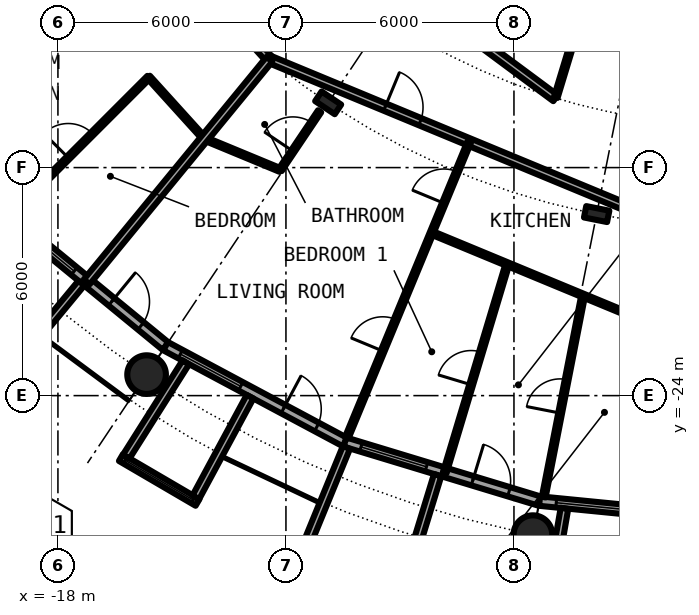
"""IFC4 building model, lengths in metres.
Left out: names, types, materials, properties, quantities, classifications, styles, units other than length and angle.
Written with IfcOpenShell. Run it as: python <this file> out.ifc"""

import sys

from ifc_helpers import new_model, si_unit, direction, frame, frame_2d, origin, origin_2d, place, context, subcontext, project, spatial, rectangle, circle, hollow_circle, i_section, extrude, element, fill, save


model = new_model("IFC4")
c1 = context("Model", 3, precision=1e-05, world=origin(), true_north=direction((0.0, 1.0)))
c2 = subcontext(c1, "Body", "Model", "MODEL_VIEW")
j1 = project(units=[si_unit("LENGTHUNIT", "METRE"), si_unit("PLANEANGLEUNIT", "RADIAN")], contexts=[c1])
p1 = place(None, origin())
s1 = spatial("IfcSite", under=j1, at=p1, CompositionType="ELEMENT")
p2 = place(p1, origin())
s2 = spatial("IfcBuilding", under=s1, at=p2, CompositionType="ELEMENT")
p3 = place(p2, frame((0.0, 0.0, 47.2)))
s3 = spatial("IfcBuildingStorey", under=s2, at=p3, CompositionType="ELEMENT", Elevation=47.2)
for number, where, z_axis, x_axis in (
    (1, (-15.667, -23.448, 0.0), (0.0, 0.0, 1.0), (1.0, 0.0, 0.0)),
    (2, (-5.501, -27.658, 0.0), (0.0, 0.0, 1.0), (1.0, 0.0, 0.0)),
):
    element("IfcColumn", number, at=place(p3, frame(where, z_axis=z_axis, x_axis=x_axis)), inside=s3, PredefinedType="COLUMN", context=c2, shape_type="SweptSolid", body=[
        extrude(hollow_circle(Radius=0.508, WallThickness=0.05, at=origin_2d()), origin(), (0.0, 0.0, 1.0), 3.05),
    ])
for number, where, z_axis, x_axis in (
    (3, (-10.889, -16.297, 0.0), (0.0, 0.0, 1.0), (-0.556, -0.831, 0.0)),
    (4, (-3.824, -19.223, 0.0), (0.0, 0.0, 1.0), (-0.195, -0.981, 0.0)),
):
    element("IfcColumn", number, at=place(p3, frame(where, z_axis=z_axis, x_axis=x_axis)), inside=s3, PredefinedType="COLUMN", context=c2, shape_type="SweptSolid", body=[
        extrude(i_section(OverallWidth=0.305, OverallDepth=0.62, WebThickness=0.021, FlangeThickness=0.04, FilletRadius=0.027, at=origin_2d()), origin(), (0.0, 0.0, 1.0), 3.05),
    ])
p4 = place(p3, frame((-19.304, -19.304, 0.0), z_axis=(0.0, 0.0, 1.0), x_axis=(0.773019449054, -0.634382322723, 0.0)))
e5 = element("IfcWall", 5, at=p4, inside=s3, PredefinedType="SOLIDWALL", context=c2, shape_type="SweptSolid", body=[
    extrude(rectangle(XDim=5.352, YDim=0.25, at=frame_2d((2.676, 0.0))), origin(), (0.0, 0.0, 1.0), 2.7),
])
p5 = place(p4, frame((0.441, 0.0, 0.3)))
e6 = element("IfcOpeningElement", 6, at=p5, cuts=e5, PredefinedType="OPENING", context=c2, shape_type="SweptSolid", body=[
    extrude(rectangle(XDim=1.8, YDim=2.1, at=frame_2d((0.9, 1.05))), frame((0.0, 0.135, 0.0), z_axis=(0.0, -1.0, 0.0), x_axis=(1.0, 0.0, 0.0)), (0.0, 0.0, 1.0), 0.27),
])
p6 = place(p4, frame((3.51, 0.0, 0.0)))
e7 = element("IfcOpeningElement", 7, at=p6, cuts=e5, PredefinedType="OPENING", context=c2, shape_type="SweptSolid", body=[
    extrude(rectangle(XDim=1.0, YDim=2.2, at=frame_2d((0.5, 1.1))), frame((0.0, 0.135, 0.0), z_axis=(0.0, -1.0, 0.0), x_axis=(1.0, 0.0, 0.0)), (0.0, 0.0, 1.0), 0.27),
])
p7 = place(p3, frame((-17.384, -21.041, -0.03), z_axis=(0.0, 0.0, 1.0), x_axis=(-0.63709551667, -0.770784861449, 0.0)))
e8 = element("IfcWall", 8, at=p7, inside=s3, PredefinedType="SOLIDWALL", context=c2, shape_type="SweptSolid", body=[
    extrude(rectangle(XDim=3.006, YDim=0.2, at=frame_2d((1.503, 0.0))), origin(), (0.0, 0.0, 1.0), 2.73),
])
p8 = place(p3, frame((-15.167, -22.699, 0.0), z_axis=(0.0, 0.0, 1.0), x_axis=(0.881915646801, -0.471407246368, 0.0)))
e9 = element("IfcWall", 9, at=p8, inside=s3, PredefinedType="SOLIDWALL", context=c2, shape_type="SweptSolid", body=[
    extrude(rectangle(XDim=5.352, YDim=0.25, at=frame_2d((2.676, 0.0))), origin(), (0.0, 0.0, 1.0), 2.7),
])
p9 = place(p8, frame((0.441, 0.0, 0.3)))
e10 = element("IfcOpeningElement", 10, at=p9, cuts=e9, PredefinedType="OPENING", context=c2, shape_type="SweptSolid", body=[
    extrude(rectangle(XDim=1.8, YDim=2.1, at=frame_2d((0.9, 1.05))), frame((0.0, 0.135, 0.0), z_axis=(0.0, -1.0, 0.0), x_axis=(1.0, 0.0, 0.0)), (0.0, 0.0, 1.0), 0.27),
])
p10 = place(p8, frame((3.51, 0.0, 0.0)))
e11 = element("IfcOpeningElement", 11, at=p10, cuts=e9, PredefinedType="OPENING", context=c2, shape_type="SweptSolid", body=[
    extrude(rectangle(XDim=1.0, YDim=2.2, at=frame_2d((0.5, 1.1))), frame((0.0, 0.135, 0.0), z_axis=(0.0, -1.0, 0.0), x_axis=(1.0, 0.0, 0.0)), (0.0, 0.0, 1.0), 0.27),
])
p11 = place(p3, frame((-16.344, -25.633, -0.03), z_axis=(0.0, 0.0, 1.0), x_axis=(0.863346521872, -0.504611517081, 0.0)))
e12 = element("IfcWall", 12, at=p11, inside=s3, PredefinedType="SOLIDWALL", context=c2, shape_type="SweptSolid", body=[
    extrude(rectangle(XDim=2.336, YDim=0.2, at=frame_2d((1.168, 0.0))), origin(), (0.0, 0.0, 1.0), 2.73),
])
p12 = place(p11, frame((0.128, 0.0, 0.33)))
e13 = element("IfcOpeningElement", 13, at=p12, cuts=e12, PredefinedType="OPENING", context=c2, shape_type="SweptSolid", body=[
    extrude(circle(Radius=1.04, at=frame_2d((1.04, 1.04))), frame((0.0, 0.11, 0.0), z_axis=(0.0, -1.0, 0.0), x_axis=(1.0, 0.0, 0.0)), (0.0, 0.0, 1.0), 0.22),
])
p13 = place(p3, frame((-14.635, -23.126, -0.03), z_axis=(0.0, 0.0, 1.0), x_axis=(-0.534437802731, -0.845207805816, 0.0)))
e14 = element("IfcWall", 14, at=p13, inside=s3, PredefinedType="SOLIDWALL", context=c2, shape_type="SweptSolid", body=[
    extrude(rectangle(XDim=2.932, YDim=0.2, at=frame_2d((1.466, 0.0))), origin(), (0.0, 0.0, 1.0), 2.73),
])
p14 = place(p3, frame((-12.945, -24.029, -0.03), z_axis=(0.0, 0.0, 1.0), x_axis=(-0.474424310775, -0.88029629861, 0.0)))
e15 = element("IfcWall", 15, at=p14, inside=s3, PredefinedType="SOLIDWALL", context=c2, shape_type="SweptSolid", body=[
    extrude(rectangle(XDim=3.006, YDim=0.2, at=frame_2d((1.503, 0.0))), origin(), (0.0, 0.0, 1.0), 2.73),
])
p15 = place(p3, frame((-10.447, -25.222, 0.0), z_axis=(0.0, 0.0, 1.0), x_axis=(0.956965678721, -0.290201119486, 0.0)))
e16 = element("IfcWall", 16, at=p15, inside=s3, PredefinedType="SOLIDWALL", context=c2, shape_type="SweptSolid", body=[
    extrude(rectangle(XDim=5.351, YDim=0.25, at=frame_2d((2.676, 0.0))), origin(), (0.0, 0.0, 1.0), 2.7),
])
p16 = place(p15, frame((0.441, 0.0, 0.3)))
e17 = element("IfcOpeningElement", 17, at=p16, cuts=e16, PredefinedType="OPENING", context=c2, shape_type="SweptSolid", body=[
    extrude(rectangle(XDim=1.8, YDim=2.1, at=frame_2d((0.9, 1.05))), frame((0.0, 0.135, 0.0), z_axis=(0.0, -1.0, 0.0), x_axis=(1.0, 0.0, 0.0)), (0.0, 0.0, 1.0), 0.27),
])
p17 = place(p15, frame((3.51, 0.0, 0.0)))
e18 = element("IfcOpeningElement", 18, at=p17, cuts=e16, PredefinedType="OPENING", context=c2, shape_type="SweptSolid", body=[
    extrude(rectangle(XDim=1.0, YDim=2.2, at=frame_2d((0.5, 1.1))), frame((0.0, 0.135, 0.0), z_axis=(0.0, -1.0, 0.0), x_axis=(1.0, 0.0, 0.0)), (0.0, 0.0, 1.0), 0.27),
])
p18 = place(p3, frame((-10.409, -25.364, -0.03), z_axis=(0.0, 0.0, 1.0), x_axis=(-0.379509886562, -0.925187681501, 0.0)))
e19 = element("IfcWall", 19, at=p18, inside=s3, PredefinedType="SOLIDWALL", context=c2, shape_type="SweptSolid", body=[
    extrude(rectangle(XDim=2.883, YDim=0.2, at=frame_2d((1.441, 0.0))), origin(), (0.0, 0.0, 1.0), 2.73),
])
p19 = place(p3, frame((-8.009, -26.092, -0.03), z_axis=(0.0, 0.0, 1.0), x_axis=(-0.293406695073, -0.955987715029, 0.0)))
e20 = element("IfcWall", 20, at=p19, inside=s3, PredefinedType="SOLIDWALL", context=c2, shape_type="SweptSolid", body=[
    extrude(rectangle(XDim=3.006, YDim=0.2, at=frame_2d((1.503, 0.0))), origin(), (0.0, 0.0, 1.0), 2.73),
])
p20 = place(p3, frame((-5.326, -26.775, 0.0), z_axis=(0.0, 0.0, 1.0), x_axis=(0.995173996315, -0.098126026407, 0.0)))
e21 = element("IfcWall", 21, at=p20, inside=s3, PredefinedType="SOLIDWALL", context=c2, shape_type="SweptSolid", body=[
    extrude(rectangle(XDim=5.352, YDim=0.25, at=frame_2d((2.676, 0.0))), origin(), (0.0, 0.0, 1.0), 2.7),
])
p21 = place(p20, frame((0.441, 0.0, 0.3)))
e22 = element("IfcOpeningElement", 22, at=p21, cuts=e21, PredefinedType="OPENING", context=c2, shape_type="SweptSolid", body=[
    extrude(rectangle(XDim=1.8, YDim=2.1, at=frame_2d((0.9, 1.05))), frame((0.0, 0.135, 0.0), z_axis=(0.0, -1.0, 0.0), x_axis=(1.0, 0.0, 0.0)), (0.0, 0.0, 1.0), 0.27),
])
p22 = place(p20, frame((3.51, 0.0, 0.0)))
e23 = element("IfcOpeningElement", 23, at=p22, cuts=e21, PredefinedType="OPENING", context=c2, shape_type="SweptSolid", body=[
    extrude(rectangle(XDim=1.0, YDim=2.2, at=frame_2d((0.5, 1.1))), frame((0.0, 0.135, 0.0), z_axis=(0.0, -1.0, 0.0), x_axis=(1.0, 0.0, 0.0)), (0.0, 0.0, 1.0), 0.27),
])
p23 = place(p3, frame((-4.671, -26.966, -0.03), z_axis=(0.0, 0.0, 1.0), x_axis=(-0.170539878907, -0.985350774954, 0.0)))
e24 = element("IfcWall", 24, at=p23, inside=s3, PredefinedType="SOLIDWALL", context=c2, shape_type="SweptSolid", body=[
    extrude(rectangle(XDim=2.932, YDim=0.2, at=frame_2d((1.466, 0.0))), origin(), (0.0, 0.0, 1.0), 2.73),
])
p24 = place(p3, frame((-15.617, -15.617, 0.0), z_axis=(0.0, 0.0, 1.0), x_axis=(0.671144831591, -0.741326254107, 0.0)))
e25 = element("IfcWall", 25, at=p24, inside=s3, PredefinedType="PARTITIONING", context=c2, shape_type="SweptSolid", body=[
    extrude(rectangle(XDim=2.181, YDim=0.1, at=frame_2d((1.091, 0.0))), origin(), (0.0, 0.0, 1.0), 2.7),
])
p25 = place(p3, frame((-14.147, -17.238, 0.0), z_axis=(0.0, 0.0, 1.0), x_axis=(0.923874819588, -0.382694810171, 0.0)))
e26 = element("IfcWall", 26, at=p25, inside=s3, PredefinedType="PARTITIONING", context=c2, shape_type="SweptSolid", body=[
    extrude(rectangle(XDim=2.158, YDim=0.1, at=frame_2d((1.079, 0.0))), origin(), (0.0, 0.0, 1.0), 2.7),
])
p26 = place(p3, frame((-8.164, -19.716, 0.0), z_axis=(0.0, 0.0, 1.0), x_axis=(0.92387253274, -0.38270033087, 0.0)))
e27 = element("IfcWall", 27, at=p26, inside=s3, PredefinedType="PARTITIONING", context=c2, shape_type="SweptSolid", body=[
    extrude(rectangle(XDim=6.475, YDim=0.1, at=frame_2d((3.238, 0.0))), origin(), (0.0, 0.0, 1.0), 2.7),
])
p27 = place(p3, frame((-16.193, -11.003, 0.0), z_axis=(0.0, 0.0, 1.0), x_axis=(0.671514934772, -0.740991020444, 0.0)))
e28 = element("IfcWall", 28, at=p27, inside=s3, PredefinedType="PARTITIONING", context=c2, shape_type="SweptSolid", body=[
    extrude(rectangle(XDim=5.598, YDim=0.2, at=frame_2d((2.799, 0.0))), origin(), (0.0, 0.0, 1.0), 2.38),
])
p28 = place(p27, frame((3.18, 0.0, 0.0)))
e29 = element("IfcOpeningElement", 29, at=p28, cuts=e28, PredefinedType="OPENING", context=c2, shape_type="SweptSolid", body=[
    extrude(rectangle(XDim=1.0, YDim=2.3, at=frame_2d((0.5, 1.15))), frame((0.0, 0.11, 0.0), z_axis=(0.0, -1.0, 0.0), x_axis=(1.0, 0.0, 0.0)), (0.0, 0.0, 1.0), 0.22),
])
p29 = place(p3, frame((-12.434, -15.151, 0.0), z_axis=(0.0, 0.0, 1.0), x_axis=(0.923888467236, -0.382661861319, 0.0)))
e30 = element("IfcWall", 30, at=p29, inside=s3, PredefinedType="PARTITIONING", context=c2, shape_type="SweptSolid", body=[
    extrude(rectangle(XDim=11.381, YDim=0.2, at=frame_2d((5.691, 0.0))), origin(), (0.0, 0.0, 1.0), 2.7),
])
p30 = place(p29, frame((3.292, 0.0, 0.0)))
e31 = element("IfcOpeningElement", 31, at=p30, cuts=e30, PredefinedType="OPENING", context=c2, shape_type="SweptSolid", body=[
    extrude(rectangle(XDim=1.0, YDim=2.3, at=frame_2d((0.5, 1.15))), frame((0.0, 0.11, 0.0), z_axis=(0.0, -1.0, 0.0), x_axis=(1.0, 0.0, 0.0)), (0.0, 0.0, 1.0), 0.22),
])
p31 = place(p3, frame((-14.037, -9.4, 0.0), z_axis=(0.0, 0.0, 1.0), x_axis=(0.803202106898, -0.595706618626, 0.0)))
e32 = element("IfcWall", 32, at=p31, inside=s3, PredefinedType="PARTITIONING", context=c2, shape_type="SweptSolid", body=[
    extrude(rectangle(XDim=11.368, YDim=0.2, at=frame_2d((5.684, 0.0))), origin(), (0.0, 0.0, 1.0), 2.7),
])
p32 = place(p31, frame((5.988, 0.0, 0.0)))
e33 = element("IfcOpeningElement", 33, at=p32, cuts=e32, PredefinedType="OPENING", context=c2, shape_type="SweptSolid", body=[
    extrude(rectangle(XDim=1.0, YDim=2.3, at=frame_2d((0.5, 1.15))), frame((0.0, 0.11, 0.0), z_axis=(0.0, -1.0, 0.0), x_axis=(1.0, 0.0, 0.0)), (0.0, 0.0, 1.0), 0.22),
])
p33 = place(p3, frame((-19.21, -19.222, 0.0), z_axis=(0.0, 0.0, 1.0), x_axis=(0.706914880313, 0.707298629994, 0.0)))
e34 = element("IfcWall", 34, at=p33, inside=s3, PredefinedType="PARTITIONING", context=c2, shape_type="SweptSolid", body=[
    extrude(rectangle(XDim=5.09, YDim=0.1, at=frame_2d((2.545, 0.0))), origin(), (0.0, 0.0, 1.0), 2.7),
])
p34 = place(p33, frame((2.095, 0.0, 0.0)))
e35 = element("IfcOpeningElement", 35, at=p34, cuts=e34, PredefinedType="OPENING", context=c2, shape_type="SweptSolid", body=[
    extrude(rectangle(XDim=0.9, YDim=2.3, at=frame_2d((0.45, 1.15))), frame((0.0, 0.06, 0.0), z_axis=(0.0, -1.0, 0.0), x_axis=(1.0, 0.0, 0.0)), (0.0, 0.0, 1.0), 0.12),
])
p35 = place(p3, frame((-17.241, -21.006, 0.0), z_axis=(0.0, 0.0, 1.0), x_axis=(0.634381303318, 0.773020285633, 0.0)))
e36 = element("IfcWall", 36, at=p35, inside=s3, PredefinedType="PARTITIONING", context=c2, shape_type="SweptSolid", body=[
    extrude(rectangle(XDim=7.576, YDim=0.2, at=frame_2d((3.788, 0.0))), origin(), (0.0, 0.0, 1.0), 2.7),
])
p36 = place(p3, frame((-12.153, -18.064, 0.0), z_axis=(0.0, 0.0, 1.0), x_axis=(0.558084773293, 0.829783939239, 0.0)))
e37 = element("IfcWall", 37, at=p36, inside=s3, PredefinedType="PARTITIONING", context=c2, shape_type="SweptSolid", body=[
    extrude(rectangle(XDim=1.862, YDim=0.1, at=frame_2d((0.931, 0.0))), origin(), (0.0, 0.0, 1.0), 2.7),
])
p37 = place(p36, frame((0.6, 0.0, 0.0)))
e38 = element("IfcOpeningElement", 38, at=p37, cuts=e37, PredefinedType="OPENING", context=c2, shape_type="SweptSolid", body=[
    extrude(rectangle(XDim=0.9, YDim=2.3, at=frame_2d((0.45, 1.15))), frame((0.0, 0.06, 0.0), z_axis=(0.0, -1.0, 0.0), x_axis=(1.0, 0.0, 0.0)), (0.0, 0.0, 1.0), 0.12),
])
p38 = place(p3, frame((-10.399, -25.106, 0.0), z_axis=(0.0, 0.0, 1.0), x_axis=(0.382697543868, 0.923873687209, 0.0)))
e39 = element("IfcWall", 39, at=p38, inside=s3, PredefinedType="PARTITIONING", context=c2, shape_type="SweptSolid", body=[
    extrude(rectangle(XDim=8.419, YDim=0.1, at=frame_2d((4.209, 0.0))), origin(), (0.0, 0.0, 1.0), 2.7),
])
p39 = place(p38, frame((6.677, 0.0, 0.0)))
e40 = element("IfcOpeningElement", 40, at=p39, cuts=e39, PredefinedType="OPENING", context=c2, shape_type="SweptSolid", body=[
    extrude(rectangle(XDim=0.9, YDim=2.3, at=frame_2d((0.45, 1.15))), frame((0.0, 0.06, 0.0), z_axis=(0.0, -1.0, 0.0), x_axis=(1.0, 0.0, 0.0)), (0.0, 0.0, 1.0), 0.12),
])
p40 = place(p38, frame((2.468, 0.0, 0.0)))
e41 = element("IfcOpeningElement", 41, at=p40, cuts=e39, PredefinedType="OPENING", context=c2, shape_type="SweptSolid", body=[
    extrude(rectangle(XDim=0.9, YDim=2.3, at=frame_2d((0.45, 1.15))), frame((0.0, 0.06, 0.0), z_axis=(0.0, -1.0, 0.0), x_axis=(1.0, 0.0, 0.0)), (0.0, 0.0, 1.0), 0.12),
])
p41 = place(p3, frame((-7.821, -26.025, 0.0), z_axis=(0.0, 0.0, 1.0), x_axis=(0.287793773423, 0.957692405723, 0.0)))
e42 = element("IfcWall", 42, at=p41, inside=s3, PredefinedType="PARTITIONING", context=c2, shape_type="SweptSolid", body=[
    extrude(rectangle(XDim=5.726, YDim=0.1, at=frame_2d((2.863, 0.0))), origin(), (0.0, 0.0, 1.0), 2.7),
])
p42 = place(p41, frame((2.413, 0.0, 0.0)))
e43 = element("IfcOpeningElement", 43, at=p42, cuts=e42, PredefinedType="OPENING", context=c2, shape_type="SweptSolid", body=[
    extrude(rectangle(XDim=0.9, YDim=2.3, at=frame_2d((0.45, 1.15))), frame((0.0, 0.06, 0.0), z_axis=(0.0, -1.0, 0.0), x_axis=(1.0, 0.0, 0.0)), (0.0, 0.0, 1.0), 0.12),
])
p43 = place(p3, frame((-5.217, -26.67, 0.0), z_axis=(0.0, 0.0, 1.0), x_axis=(0.192109041462, 0.981373586453, 0.0)))
e44 = element("IfcWall", 44, at=p43, inside=s3, PredefinedType="PARTITIONING", context=c2, shape_type="SweptSolid", body=[
    extrude(rectangle(XDim=5.404, YDim=0.1, at=frame_2d((2.702, 0.0))), origin(), (0.0, 0.0, 1.0), 2.7),
])
p44 = place(p43, frame((2.252, 0.0, 0.0)))
e45 = element("IfcOpeningElement", 45, at=p44, cuts=e44, PredefinedType="OPENING", context=c2, shape_type="SweptSolid", body=[
    extrude(rectangle(XDim=0.9, YDim=2.3, at=frame_2d((0.45, 1.15))), frame((0.0, 0.06, 0.0), z_axis=(0.0, -1.0, 0.0), x_axis=(1.0, 0.0, 0.0)), (0.0, 0.0, 1.0), 0.12),
])
p45 = place(p3, frame((-4.128, -13.609, 0.0), z_axis=(0.0, 0.0, 1.0), x_axis=(-0.290456070925, -0.956888327269, 0.0)))
e46 = element("IfcWall", 46, at=p45, inside=s3, PredefinedType="PARTITIONING", context=c2, shape_type="SweptSolid", body=[
    extrude(rectangle(XDim=2.658, YDim=0.1, at=frame_2d((1.329, 0.0))), origin(), (0.0, 0.0, 1.0), 2.7),
])
p46 = place(p5, origin())
e47 = element("IfcWindow", 47, at=p46, inside=s3, PartitioningType="SINGLE_PANEL", PredefinedType="WINDOW", context=c2, shape_type="SweptSolid", body=[
    extrude(rectangle(XDim=1.8, YDim=2.1, at=frame_2d((0.9, 1.05))), frame((0.0, 0.03, 0.0), z_axis=(0.0, -1.0, 0.0), x_axis=(1.0, 0.0, 0.0)), (0.0, 0.0, 1.0), 0.06),
])
fill(e6, e47)
p47 = place(p6, origin())
e48 = element("IfcDoor", 48, at=p47, inside=s3, OperationType="SINGLE_SWING_LEFT", PredefinedType="DOOR", context=c2, shape_type="SweptSolid", body=[
    extrude(rectangle(XDim=1.0, YDim=2.2, at=frame_2d((0.5, 1.1))), frame((0.0, 0.025, 0.0), z_axis=(0.0, -1.0, 0.0), x_axis=(1.0, 0.0, 0.0)), (0.0, 0.0, 1.0), 0.05),
])
fill(e7, e48)
p48 = place(p9, origin())
e49 = element("IfcWindow", 49, at=p48, inside=s3, PartitioningType="SINGLE_PANEL", PredefinedType="WINDOW", context=c2, shape_type="SweptSolid", body=[
    extrude(rectangle(XDim=1.8, YDim=2.1, at=frame_2d((0.9, 1.05))), frame((0.0, 0.03, 0.0), z_axis=(0.0, -1.0, 0.0), x_axis=(1.0, 0.0, 0.0)), (0.0, 0.0, 1.0), 0.06),
])
fill(e10, e49)
p49 = place(p12, origin())
e50 = element("IfcWindow", 50, at=p49, inside=s3, PartitioningType="SINGLE_PANEL", PredefinedType="WINDOW", context=c2, shape_type="SweptSolid", body=[
    extrude(circle(Radius=1.04, at=frame_2d((1.04, 1.04))), frame((0.0, 0.03, 0.0), z_axis=(0.0, -1.0, 0.0), x_axis=(1.0, 0.0, 0.0)), (0.0, 0.0, 1.0), 0.06),
])
fill(e13, e50)
p50 = place(p10, origin())
e51 = element("IfcDoor", 51, at=p50, inside=s3, OperationType="SINGLE_SWING_LEFT", PredefinedType="DOOR", context=c2, shape_type="SweptSolid", body=[
    extrude(rectangle(XDim=1.0, YDim=2.2, at=frame_2d((0.5, 1.1))), frame((0.0, 0.025, 0.0), z_axis=(0.0, -1.0, 0.0), x_axis=(1.0, 0.0, 0.0)), (0.0, 0.0, 1.0), 0.05),
])
fill(e11, e51)
p51 = place(p16, origin())
e52 = element("IfcWindow", 52, at=p51, inside=s3, PartitioningType="SINGLE_PANEL", PredefinedType="WINDOW", context=c2, shape_type="SweptSolid", body=[
    extrude(rectangle(XDim=1.8, YDim=2.1, at=frame_2d((0.9, 1.05))), frame((0.0, 0.03, 0.0), z_axis=(0.0, -1.0, 0.0), x_axis=(1.0, 0.0, 0.0)), (0.0, 0.0, 1.0), 0.06),
])
fill(e17, e52)
p52 = place(p17, origin())
e53 = element("IfcDoor", 53, at=p52, inside=s3, OperationType="SINGLE_SWING_LEFT", PredefinedType="DOOR", context=c2, shape_type="SweptSolid", body=[
    extrude(rectangle(XDim=1.0, YDim=2.2, at=frame_2d((0.5, 1.1))), frame((0.0, 0.025, 0.0), z_axis=(0.0, -1.0, 0.0), x_axis=(1.0, 0.0, 0.0)), (0.0, 0.0, 1.0), 0.05),
])
fill(e18, e53)
p53 = place(p21, origin())
e54 = element("IfcWindow", 54, at=p53, inside=s3, PartitioningType="SINGLE_PANEL", PredefinedType="WINDOW", context=c2, shape_type="SweptSolid", body=[
    extrude(rectangle(XDim=1.8, YDim=2.1, at=frame_2d((0.9, 1.05))), frame((0.0, 0.03, 0.0), z_axis=(0.0, -1.0, 0.0), x_axis=(1.0, 0.0, 0.0)), (0.0, 0.0, 1.0), 0.06),
])
fill(e22, e54)
p54 = place(p34, origin())
e55 = element("IfcDoor", 55, at=p54, inside=s3, OperationType="SINGLE_SWING_RIGHT", PredefinedType="DOOR", context=c2, shape_type="SweptSolid", body=[
    extrude(rectangle(XDim=0.9, YDim=2.3, at=frame_2d((0.45, 1.15))), frame((0.0, 0.025, 0.0), z_axis=(0.0, -1.0, 0.0), x_axis=(1.0, 0.0, 0.0)), (0.0, 0.0, 1.0), 0.05),
])
fill(e35, e55)
p55 = place(p30, origin())
e56 = element("IfcDoor", 56, at=p55, inside=s3, OperationType="SINGLE_SWING_LEFT", PredefinedType="DOOR", context=c2, shape_type="SweptSolid", body=[
    extrude(rectangle(XDim=1.0, YDim=2.3, at=frame_2d((0.5, 1.15))), frame((0.0, 0.025, 0.0), z_axis=(0.0, -1.0, 0.0), x_axis=(1.0, 0.0, 0.0)), (0.0, 0.0, 1.0), 0.05),
])
fill(e31, e56)
p56 = place(p37, origin())
e57 = element("IfcDoor", 57, at=p56, inside=s3, OperationType="SINGLE_SWING_RIGHT", PredefinedType="DOOR", context=c2, shape_type="SweptSolid", body=[
    extrude(rectangle(XDim=0.9, YDim=2.3, at=frame_2d((0.45, 1.15))), frame((0.0, 0.025, 0.0), z_axis=(0.0, -1.0, 0.0), x_axis=(1.0, 0.0, 0.0)), (0.0, 0.0, 1.0), 0.05),
])
fill(e38, e57)
p57 = place(p39, origin())
e58 = element("IfcDoor", 58, at=p57, inside=s3, OperationType="SINGLE_SWING_RIGHT", PredefinedType="DOOR", context=c2, shape_type="SweptSolid", body=[
    extrude(rectangle(XDim=0.9, YDim=2.3, at=frame_2d((0.45, 1.15))), frame((0.0, 0.025, 0.0), z_axis=(0.0, -1.0, 0.0), x_axis=(1.0, 0.0, 0.0)), (0.0, 0.0, 1.0), 0.05),
])
fill(e40, e58)
p58 = place(p40, origin())
e59 = element("IfcDoor", 59, at=p58, inside=s3, OperationType="SINGLE_SWING_LEFT", PredefinedType="DOOR", context=c2, shape_type="SweptSolid", body=[
    extrude(rectangle(XDim=0.9, YDim=2.3, at=frame_2d((0.45, 1.15))), frame((0.0, 0.025, 0.0), z_axis=(0.0, -1.0, 0.0), x_axis=(1.0, 0.0, 0.0)), (0.0, 0.0, 1.0), 0.05),
])
fill(e41, e59)
p59 = place(p42, origin())
e60 = element("IfcDoor", 60, at=p59, inside=s3, OperationType="SINGLE_SWING_LEFT", PredefinedType="DOOR", context=c2, shape_type="SweptSolid", body=[
    extrude(rectangle(XDim=0.9, YDim=2.3, at=frame_2d((0.45, 1.15))), frame((0.0, 0.025, 0.0), z_axis=(0.0, -1.0, 0.0), x_axis=(1.0, 0.0, 0.0)), (0.0, 0.0, 1.0), 0.05),
])
fill(e43, e60)
p60 = place(p44, origin())
e61 = element("IfcDoor", 61, at=p60, inside=s3, OperationType="SINGLE_SWING_RIGHT", PredefinedType="DOOR", context=c2, shape_type="SweptSolid", body=[
    extrude(rectangle(XDim=0.9, YDim=2.3, at=frame_2d((0.45, 1.15))), frame((0.0, 0.025, 0.0), z_axis=(0.0, -1.0, 0.0), x_axis=(1.0, 0.0, 0.0)), (0.0, 0.0, 1.0), 0.05),
])
fill(e45, e61)
save(model, sys.argv[1])
